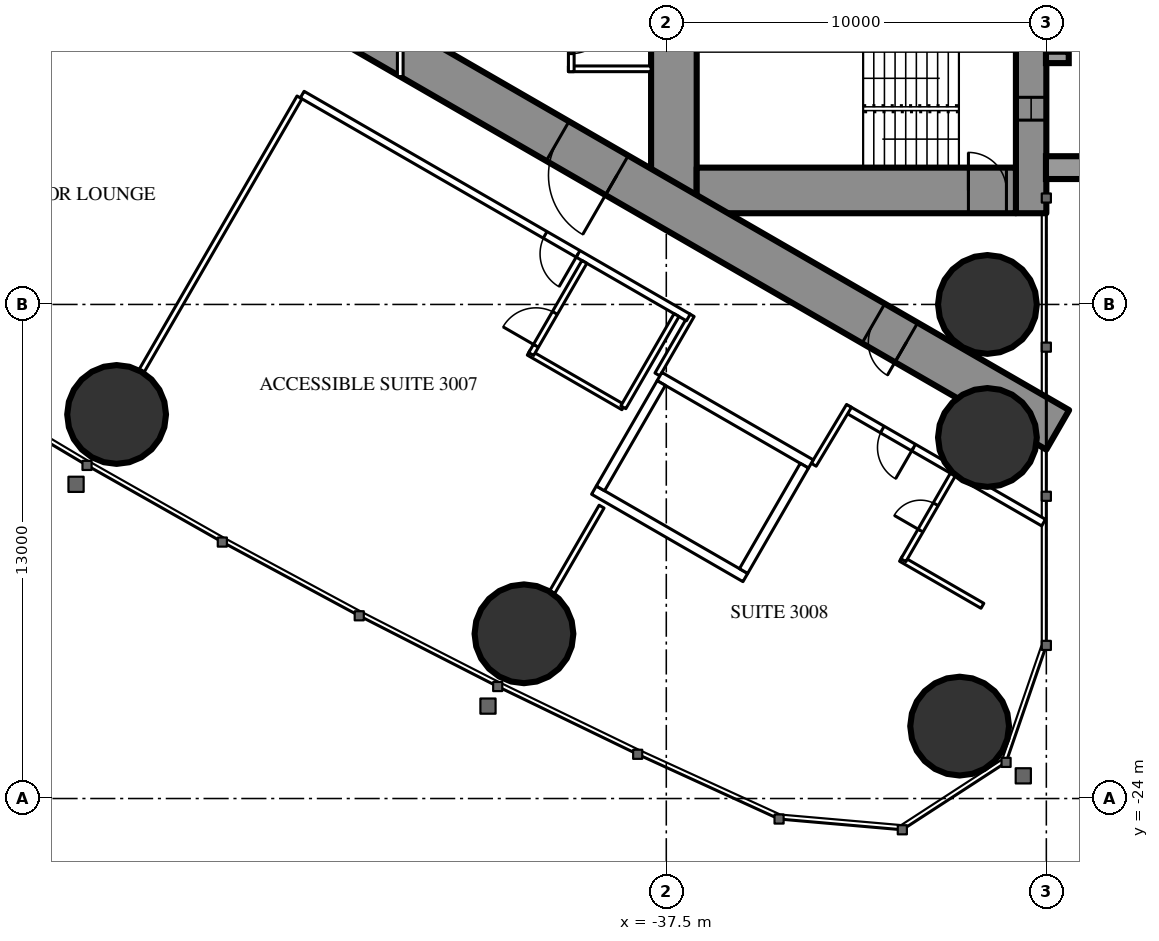
"""IFC4 building model, lengths in metres.
Left out: names, types, materials, properties, quantities, classifications, styles, units other than length and angle.
Written with IfcOpenShell. Run it as: python <this file> out.ifc"""

import sys

from ifc_helpers import new_model, si_unit, direction, frame, frame_2d, origin, origin_2d, place, context, subcontext, project, spatial, rectangle, hollow_circle, extrude, element, fill, save


model = new_model("IFC4")
c1 = context("Model", 3, precision=1e-05, world=origin(), true_north=direction((0.0, 1.0)))
c2 = subcontext(c1, "Body", "Model", "MODEL_VIEW")
j1 = project(units=[si_unit("LENGTHUNIT", "METRE"), si_unit("PLANEANGLEUNIT", "RADIAN")], contexts=[c1])
p1 = place(None, origin())
s1 = spatial("IfcSite", under=j1, at=p1, CompositionType="ELEMENT")
p2 = place(p1, origin())
s2 = spatial("IfcBuilding", under=s1, at=p2, CompositionType="ELEMENT")
p3 = place(p2, frame((0.0, 0.0, 115.1)))
s3 = spatial("IfcBuildingStorey", under=s2, at=p3, CompositionType="ELEMENT", Elevation=115.1)
for number, where, z_axis, x_axis in (
    (1, (-29.781, -22.095, 0.0), (0.0, 0.0, 1.0), (1.0, 0.0, 0.0)),
    (2, (-29.05, -11.0, 0.0), (0.0, 0.0, 1.0), (1.0, 0.0, 0.0)),
    (3, (-29.05, -14.5, 0.0), (0.0, 0.0, 1.0), (1.0, 0.0, 0.0)),
    (4, (-51.963, -13.895, 0.0), (0.0, 0.0, 1.0), (1.0, 0.0, 0.0)),
    (5, (-41.245, -19.666, 0.0), (0.0, 0.0, 1.0), (1.0, 0.0, 0.0)),
):
    element("IfcColumn", number, at=place(p3, frame(where, z_axis=z_axis, x_axis=x_axis)), inside=s3, PredefinedType="COLUMN", context=c2, shape_type="SweptSolid", body=[
        extrude(hollow_circle(Radius=1.3, WallThickness=0.1, at=origin_2d()), origin(), (0.0, 0.0, 1.0), 3.5),
    ])
p4 = place(p3, frame((-27.9, 8.6, 0.0), z_axis=(0.0, 0.0, 1.0), x_axis=(0.0, -1.0, 0.0)))
e6 = element("IfcWall", 6, at=p4, inside=s3, PredefinedType="SHEAR", context=c2, shape_type="SweptSolid", body=[
    extrude(rectangle(XDim=17.2, YDim=0.8, at=frame_2d((8.6, 0.0))), origin(), (0.0, 0.0, 1.0), 3.5),
])
p5 = place(p4, frame((2.45, 0.0, 0.6)))
e7 = element("IfcOpeningElement", 7, at=p5, cuts=e6, PredefinedType="OPENING", context=c2, shape_type="SweptSolid", body=[
    extrude(rectangle(XDim=0.6, YDim=2.1, at=frame_2d((0.3, 1.05))), frame((0.0, 0.41, 0.0), z_axis=(0.0, -1.0, 0.0), x_axis=(1.0, 0.0, 0.0)), (0.0, 0.0, 1.0), 0.82),
])
p6 = place(p4, frame((14.15, 0.0, 0.6)))
e8 = element("IfcOpeningElement", 8, at=p6, cuts=e6, PredefinedType="OPENING", context=c2, shape_type="SweptSolid", body=[
    extrude(rectangle(XDim=0.6, YDim=2.1, at=frame_2d((0.3, 1.05))), frame((0.0, 0.41, 0.0), z_axis=(0.0, -1.0, 0.0), x_axis=(1.0, 0.0, 0.0)), (0.0, 0.0, 1.0), 0.82),
])
p7 = place(p3, frame((-37.3, 8.6, 0.0), z_axis=(0.0, 0.0, 1.0), x_axis=(0.0, -1.0, 0.0)))
e9 = element("IfcWall", 9, at=p7, inside=s3, PredefinedType="SHEAR", context=c2, shape_type="SweptSolid", body=[
    extrude(rectangle(XDim=17.2, YDim=1.2, at=frame_2d((8.6, 0.0))), origin(), (0.0, 0.0, 1.0), 3.5),
])
p8 = place(p7, frame((7.7, 0.0, 0.0)))
e10 = element("IfcOpeningElement", 10, at=p8, cuts=e9, PredefinedType="OPENING", context=c2, shape_type="SweptSolid", body=[
    extrude(rectangle(XDim=1.8, YDim=2.2, at=frame_2d((0.9, 1.1))), frame((0.0, 0.61, 0.0), z_axis=(0.0, -1.0, 0.0), x_axis=(1.0, 0.0, 0.0)), (0.0, 0.0, 1.0), 1.22),
])
p9 = place(p3, frame((-28.3, -8.0, 0.0), z_axis=(0.0, 0.0, 1.0), x_axis=(-1.0, 0.0, 0.0)))
e11 = element("IfcWall", 11, at=p9, inside=s3, PredefinedType="SHEAR", context=c2, shape_type="SweptSolid", body=[
    extrude(rectangle(XDim=8.4, YDim=1.2, at=frame_2d((4.2, 0.0))), origin(), (0.0, 0.0, 1.0), 3.5),
])
p10 = place(p9, frame((0.25, 0.0, 0.0)))
e12 = element("IfcOpeningElement", 12, at=p10, cuts=e11, PredefinedType="OPENING", context=c2, shape_type="SweptSolid", body=[
    extrude(rectangle(XDim=1.0, YDim=2.2, at=frame_2d((0.5, 1.1))), frame((0.0, 0.61, 0.0), z_axis=(0.0, -1.0, 0.0), x_axis=(1.0, 0.0, 0.0)), (0.0, 0.0, 1.0), 1.22),
])
p11 = place(p3, frame((-27.2, -14.3, 0.0), z_axis=(0.0, 0.0, 1.0), x_axis=(-0.866024021859, 0.500002393557, 0.0)))
e13 = element("IfcWall", 13, at=p11, inside=s3, PredefinedType="SHEAR", context=c2, shape_type="SweptSolid", body=[
    extrude(rectangle(XDim=27.907, YDim=1.2, at=frame_2d((13.954, 0.0))), origin(), (0.0, 0.0, 1.0), 3.5),
])
p12 = place(p11, frame((4.6, 0.0, 0.0)))
e14 = element("IfcOpeningElement", 14, at=p12, cuts=e13, PredefinedType="OPENING", context=c2, shape_type="SweptSolid", body=[
    extrude(rectangle(XDim=1.0, YDim=2.2, at=frame_2d((0.5, 1.1))), frame((0.0, 0.61, 0.0), z_axis=(0.0, -1.0, 0.0), x_axis=(1.0, 0.0, 0.0)), (0.0, 0.0, 1.0), 1.22),
])
p13 = place(p11, frame((13.395, 0.0, 0.0)))
e15 = element("IfcOpeningElement", 15, at=p13, cuts=e13, PredefinedType="OPENING", context=c2, shape_type="SweptSolid", body=[
    extrude(rectangle(XDim=1.8, YDim=2.2, at=frame_2d((0.9, 1.1))), frame((0.0, 0.61, 0.0), z_axis=(0.0, -1.0, 0.0), x_axis=(1.0, 0.0, 0.0)), (0.0, 0.0, 1.0), 1.22),
])
p14 = place(p3, frame((-47.151, -5.552, 0.0), z_axis=(0.0, 0.0, 1.0), x_axis=(-0.500003012045, -0.866023664773, 0.0)))
e16 = element("IfcWall", 16, at=p14, inside=s3, PredefinedType="PARTITIONING", context=c2, shape_type="SweptSolid", body=[
    extrude(rectangle(XDim=8.311, YDim=0.15, at=frame_2d((4.156, 0.0))), origin(), (0.0, 0.0, 1.0), 2.2),
])
p15 = place(p3, frame((-39.202, -16.32, 0.0), z_axis=(0.0, 0.0, 1.0), x_axis=(-0.49997716683, -0.86603858612, 0.0)))
e17 = element("IfcWall", 17, at=p15, inside=s3, PredefinedType="PARTITIONING", context=c2, shape_type="SweptSolid", body=[
    extrude(rectangle(XDim=2.6, YDim=0.15, at=frame_2d((1.3, 0.0))), origin(), (0.0, 0.0, 1.0), 3.25),
])
p16 = place(p3, frame((-27.572, -16.741, 0.0), z_axis=(0.0, 0.0, 1.0), x_axis=(-0.866024464444, 0.500001626982, 0.0)))
e18 = element("IfcWall", 18, at=p16, inside=s3, PredefinedType="PARTITIONING", context=c2, shape_type="SweptSolid", body=[
    extrude(rectangle(XDim=5.955, YDim=0.2, at=frame_2d((2.978, 0.0))), origin(), (0.0, 0.0, 1.0), 3.25),
])
p17 = place(p16, frame((3.95, 0.0, 0.0)))
e19 = element("IfcOpeningElement", 19, at=p17, cuts=e18, PredefinedType="OPENING", context=c2, shape_type="SweptSolid", body=[
    extrude(rectangle(XDim=0.95, YDim=2.2, at=frame_2d((0.475, 1.1))), frame((0.0, 0.11, 0.0), z_axis=(0.0, -1.0, 0.0), x_axis=(1.0, 0.0, 0.0)), (0.0, 0.0, 1.0), 0.22),
])
p18 = place(p3, frame((-36.831, -11.28, 0.0), z_axis=(0.0, 0.0, 1.0), x_axis=(-0.499937177781, -0.866061671171, 0.0)))
e20 = element("IfcWall", 20, at=p18, inside=s3, PredefinedType="PARTITIONING", context=c2, shape_type="SweptSolid", body=[
    extrude(rectangle(XDim=1.804, YDim=0.15, at=frame_2d((0.902, 0.0))), origin(), (0.0, 0.0, 1.0), 3.25),
])
p19 = place(p3, frame((-33.621, -15.218, 0.0), z_axis=(0.0, 0.0, 1.0), x_axis=(0.514336634837, 0.857588377991, 0.0)))
e21 = element("IfcWall", 21, at=p19, inside=s3, PredefinedType="PARTITIONING", context=c2, shape_type="SweptSolid", body=[
    extrude(rectangle(XDim=1.805, YDim=0.15, at=frame_2d((0.903, 0.0))), origin(), (0.0, 0.0, 1.0), 3.25),
])
p20 = place(p3, frame((-36.92, -11.344, 0.0), z_axis=(0.0, 0.0, 1.0), x_axis=(-0.866027897759, 0.499995680284, 0.0)))
e22 = element("IfcWall", 22, at=p20, inside=s3, PredefinedType="PARTITIONING", context=c2, shape_type="SweptSolid", body=[
    extrude(rectangle(XDim=11.731, YDim=0.2, at=frame_2d((5.865, 0.0))), origin(), (0.0, 0.0, 1.0), 3.25),
])
p21 = place(p20, frame((3.35, 0.0, 0.0)))
e23 = element("IfcOpeningElement", 23, at=p21, cuts=e22, PredefinedType="OPENING", context=c2, shape_type="SweptSolid", body=[
    extrude(rectangle(XDim=1.0, YDim=2.2, at=frame_2d((0.5, 1.1))), frame((0.0, 0.11, 0.0), z_axis=(0.0, -1.0, 0.0), x_axis=(1.0, 0.0, 0.0)), (0.0, 0.0, 1.0), 0.22),
])
p22 = place(p3, frame((-38.63, -13.705, 0.0), z_axis=(0.0, 0.0, 1.0), x_axis=(-0.866018712932, 0.500011588718, 0.0)))
e24 = element("IfcWall", 24, at=p22, inside=s3, PredefinedType="PARTITIONING", context=c2, shape_type="SweptSolid", body=[
    extrude(rectangle(XDim=2.875, YDim=0.15, at=frame_2d((1.438, 0.0))), origin(), (0.0, 0.0, 1.0), 3.25),
])
p23 = place(p3, frame((-39.655, -9.88, 0.0), z_axis=(0.0, 0.0, 1.0), x_axis=(-0.500049511043, -0.865996816683, 0.0)))
e25 = element("IfcWall", 25, at=p23, inside=s3, PredefinedType="PARTITIONING", context=c2, shape_type="SweptSolid", body=[
    extrude(rectangle(XDim=2.8, YDim=0.15, at=frame_2d((1.4, 0.0))), origin(), (0.0, 0.0, 1.0), 3.25),
])
p24 = place(p23, frame((1.55, 0.0, 0.0)))
e26 = element("IfcOpeningElement", 26, at=p24, cuts=e25, PredefinedType="OPENING", context=c2, shape_type="SweptSolid", body=[
    extrude(rectangle(XDim=1.0, YDim=2.2, at=frame_2d((0.5, 1.1))), frame((0.0, 0.085, 0.0), z_axis=(0.0, -1.0, 0.0), x_axis=(1.0, 0.0, 0.0)), (0.0, 0.0, 1.0), 0.17),
])
p25 = place(p3, frame((-37.23, -11.281, 0.0), z_axis=(0.0, 0.0, 1.0), x_axis=(-0.500049511043, -0.865996816683, 0.0)))
e27 = element("IfcWall", 27, at=p25, inside=s3, PredefinedType="PARTITIONING", context=c2, shape_type="SweptSolid", body=[
    extrude(rectangle(XDim=2.8, YDim=0.15, at=frame_2d((1.4, 0.0))), origin(), (0.0, 0.0, 1.0), 3.25),
])
p26 = place(p3, frame((-29.182, -18.929, 0.0), z_axis=(0.0, 0.0, 1.0), x_axis=(-0.866006523861, 0.500032699561, 0.0)))
e28 = element("IfcWall", 28, at=p26, inside=s3, PredefinedType="PARTITIONING", context=c2, shape_type="SweptSolid", body=[
    extrude(rectangle(XDim=2.475, YDim=0.15, at=frame_2d((1.237, 0.0))), origin(), (0.0, 0.0, 1.0), 3.25),
])
p27 = place(p3, frame((-29.96, -15.478, 0.0), z_axis=(0.0, 0.0, 1.0), x_axis=(-0.500006934395, -0.866021400173, 0.0)))
e29 = element("IfcWall", 29, at=p27, inside=s3, PredefinedType="PARTITIONING", context=c2, shape_type="SweptSolid", body=[
    extrude(rectangle(XDim=2.6, YDim=0.15, at=frame_2d((1.3, 0.0))), origin(), (0.0, 0.0, 1.0), 3.25),
])
p28 = place(p27, frame((0.9, 0.0, 0.0)))
e30 = element("IfcOpeningElement", 30, at=p28, cuts=e29, PredefinedType="OPENING", context=c2, shape_type="SweptSolid", body=[
    extrude(rectangle(XDim=0.8, YDim=2.2, at=frame_2d((0.4, 1.1))), frame((0.0, 0.085, 0.0), z_axis=(0.0, -1.0, 0.0), x_axis=(1.0, 0.0, 0.0)), (0.0, 0.0, 1.0), 0.17),
])
p29 = place(p3, frame((-37.9, -4.8, 0.0), z_axis=(0.0, 0.0, 1.0), x_axis=(-1.0, 0.0, 0.0)))
e31 = element("IfcWall", 31, at=p29, inside=s3, PredefinedType="PARTITIONING", context=c2, shape_type="SweptSolid", body=[
    extrude(rectangle(XDim=2.175, YDim=0.15, at=frame_2d((1.087, 0.0))), origin(), (0.0, 0.0, 1.0), 3.25),
])
p30 = place(p3, frame((-40.0, -2.925, 0.0), z_axis=(0.0, 0.0, 1.0), x_axis=(0.0, -1.0, 0.0)))
e32 = element("IfcWall", 32, at=p30, inside=s3, PredefinedType="PARTITIONING", context=c2, shape_type="SweptSolid", body=[
    extrude(rectangle(XDim=1.95, YDim=0.15, at=frame_2d((0.975, 0.0))), origin(), (0.0, 0.0, 1.0), 3.25),
])
p31 = place(p30, frame((0.475, 0.0, 0.0)))
e33 = element("IfcOpeningElement", 33, at=p31, cuts=e32, PredefinedType="OPENING", context=c2, shape_type="SweptSolid", body=[
    extrude(rectangle(XDim=1.0, YDim=2.2, at=frame_2d((0.5, 1.1))), frame((0.0, 0.085, 0.0), z_axis=(0.0, -1.0, 0.0), x_axis=(1.0, 0.0, 0.0)), (0.0, 0.0, 1.0), 0.17),
])
p32 = place(p3, frame((-44.5, 5.005, 0.0), z_axis=(0.0, 0.0, 1.0), x_axis=(0.0, -1.0, 0.0)))
e34 = element("IfcWall", 34, at=p32, inside=s3, PredefinedType="PARTITIONING", context=c2, shape_type="SweptSolid", body=[
    extrude(rectangle(XDim=10.009, YDim=0.15, at=frame_2d((5.005, 0.0))), origin(), (0.0, 0.0, 1.0), 2.45),
])
p33 = place(p32, frame((2.002, 0.0, 0.0)))
e35 = element("IfcOpeningElement", 35, at=p33, cuts=e34, PredefinedType="OPENING", context=c2, shape_type="SweptSolid", body=[
    extrude(rectangle(XDim=1.0, YDim=2.2, at=frame_2d((0.5, 1.1))), frame((0.0, 0.085, 0.0), z_axis=(0.0, -1.0, 0.0), x_axis=(1.0, 0.0, 0.0)), (0.0, 0.0, 1.0), 0.17),
])
p34 = place(p32, frame((7.007, 0.0, 0.0)))
e36 = element("IfcOpeningElement", 36, at=p34, cuts=e34, PredefinedType="OPENING", context=c2, shape_type="SweptSolid", body=[
    extrude(rectangle(XDim=1.0, YDim=2.2, at=frame_2d((0.5, 1.1))), frame((0.0, 0.085, 0.0), z_axis=(0.0, -1.0, 0.0), x_axis=(1.0, 0.0, 0.0)), (0.0, 0.0, 1.0), 0.17),
])
p35 = place(p3, frame((-33.696, -15.197, 0.0), z_axis=(0.0, 0.0, 1.0), x_axis=(-0.865976953817, 0.500083908417, 0.0)))
e37 = element("IfcWall", 37, at=p35, inside=s3, PredefinedType="PARTITIONING", context=c2, shape_type="SweptSolid", body=[
    extrude(rectangle(XDim=4.599, YDim=0.25, at=frame_2d((2.3, 0.0))), origin(), (0.0, 0.0, 1.0), 3.25),
])
p36 = place(p3, frame((-35.42, -18.186, 0.0), z_axis=(0.0, 0.0, 1.0), x_axis=(-0.865990227814, 0.50006092162, 0.0)))
e38 = element("IfcWall", 38, at=p36, inside=s3, PredefinedType="PARTITIONING", context=c2, shape_type="SweptSolid", body=[
    extrude(rectangle(XDim=4.6, YDim=0.25, at=frame_2d((2.3, 0.0))), origin(), (0.0, 0.0, 1.0), 3.25),
])
p37 = place(p3, frame((-33.866, -15.243, 0.0), z_axis=(0.0, 0.0, 1.0), x_axis=(-0.499929347863, -0.866066190972, 0.0)))
e39 = element("IfcWall", 39, at=p37, inside=s3, PredefinedType="PARTITIONING", context=c2, shape_type="SweptSolid", body=[
    extrude(rectangle(XDim=3.201, YDim=0.25, at=frame_2d((1.6, 0.0))), origin(), (0.0, 0.0, 1.0), 3.25),
])
p38 = place(p3, frame((-37.633, -13.068, 0.0), z_axis=(0.0, 0.0, 1.0), x_axis=(-0.499872130319, -0.866099216793, 0.0)))
e40 = element("IfcWall", 40, at=p38, inside=s3, PredefinedType="PARTITIONING", context=c2, shape_type="SweptSolid", body=[
    extrude(rectangle(XDim=3.2, YDim=0.25, at=frame_2d((1.6, 0.0))), origin(), (0.0, 0.0, 1.0), 3.25),
])
p39 = place(p24, origin())
e41 = element("IfcDoor", 41, at=p39, inside=s3, OperationType="SINGLE_SWING_RIGHT", PredefinedType="DOOR", context=c2, shape_type="SweptSolid", body=[
    extrude(rectangle(XDim=1.0, YDim=2.2, at=frame_2d((0.5, 1.1))), frame((0.0, 0.025, 0.0), z_axis=(0.0, -1.0, 0.0), x_axis=(1.0, 0.0, 0.0)), (0.0, 0.0, 1.0), 0.05),
])
fill(e26, e41)
p40 = place(p21, origin())
e42 = element("IfcDoor", 42, at=p40, inside=s3, OperationType="SINGLE_SWING_LEFT", PredefinedType="DOOR", context=c2, shape_type="SweptSolid", body=[
    extrude(rectangle(XDim=1.0, YDim=2.2, at=frame_2d((0.5, 1.1))), frame((0.0, 0.025, 0.0), z_axis=(0.0, -1.0, 0.0), x_axis=(1.0, 0.0, 0.0)), (0.0, 0.0, 1.0), 0.05),
])
fill(e23, e42)
p41 = place(p28, origin())
e43 = element("IfcDoor", 43, at=p41, inside=s3, OperationType="SINGLE_SWING_RIGHT", PredefinedType="DOOR", context=c2, shape_type="SweptSolid", body=[
    extrude(rectangle(XDim=0.8, YDim=2.2, at=frame_2d((0.4, 1.1))), frame((0.0, 0.025, 0.0), z_axis=(0.0, -1.0, 0.0), x_axis=(1.0, 0.0, 0.0)), (0.0, 0.0, 1.0), 0.05),
])
fill(e30, e43)
p42 = place(p17, origin())
e44 = element("IfcDoor", 44, at=p42, inside=s3, OperationType="SINGLE_SWING_LEFT", PredefinedType="DOOR", context=c2, shape_type="SweptSolid", body=[
    extrude(rectangle(XDim=0.95, YDim=2.2, at=frame_2d((0.475, 1.1))), frame((0.0, 0.025, 0.0), z_axis=(0.0, -1.0, 0.0), x_axis=(1.0, 0.0, 0.0)), (0.0, 0.0, 1.0), 0.05),
])
fill(e19, e44)
p43 = place(p31, origin())
e45 = element("IfcDoor", 45, at=p43, inside=s3, OperationType="SINGLE_SWING_LEFT", PredefinedType="DOOR", context=c2, shape_type="SweptSolid", body=[
    extrude(rectangle(XDim=1.0, YDim=2.2, at=frame_2d((0.5, 1.1))), frame((0.0, 0.025, 0.0), z_axis=(0.0, -1.0, 0.0), x_axis=(1.0, 0.0, 0.0)), (0.0, 0.0, 1.0), 0.05),
])
fill(e33, e45)
p44 = place(p12, origin())
e46 = element("IfcDoor", 46, at=p44, inside=s3, OperationType="SINGLE_SWING_LEFT", PredefinedType="DOOR", context=c2, shape_type="SweptSolid", body=[
    extrude(rectangle(XDim=1.0, YDim=2.2, at=frame_2d((0.5, 1.1))), frame((0.0, 0.025, 0.0), z_axis=(0.0, -1.0, 0.0), x_axis=(1.0, 0.0, 0.0)), (0.0, 0.0, 1.0), 0.05),
])
fill(e14, e46)
p45 = place(p13, origin())
e47 = element("IfcDoor", 47, at=p45, inside=s3, OperationType="DOUBLE_DOOR_SINGLE_SWING", PredefinedType="DOOR", context=c2, shape_type="SweptSolid", body=[
    extrude(rectangle(XDim=1.8, YDim=2.2, at=frame_2d((0.9, 1.1))), frame((0.0, 0.025, 0.0), z_axis=(0.0, -1.0, 0.0), x_axis=(1.0, 0.0, 0.0)), (0.0, 0.0, 1.0), 0.05),
])
fill(e15, e47)
p46 = place(p10, origin())
e48 = element("IfcDoor", 48, at=p46, inside=s3, OperationType="SINGLE_SWING_RIGHT", PredefinedType="DOOR", context=c2, shape_type="SweptSolid", body=[
    extrude(rectangle(XDim=1.0, YDim=2.2, at=frame_2d((0.5, 1.1))), frame((0.0, 0.025, 0.0), z_axis=(0.0, -1.0, 0.0), x_axis=(1.0, 0.0, 0.0)), (0.0, 0.0, 1.0), 0.05),
])
fill(e12, e48)
p47 = place(p6, origin())
e49 = element("IfcWindow", 49, at=p47, inside=s3, PartitioningType="SINGLE_PANEL", PredefinedType="WINDOW", context=c2, shape_type="SweptSolid", body=[
    extrude(rectangle(XDim=0.6, YDim=2.1, at=frame_2d((0.3, 1.05))), frame((0.0, 0.03, 0.0), z_axis=(0.0, -1.0, 0.0), x_axis=(1.0, 0.0, 0.0)), (0.0, 0.0, 1.0), 0.06),
])
fill(e8, e49)
save(model, sys.argv[1])
